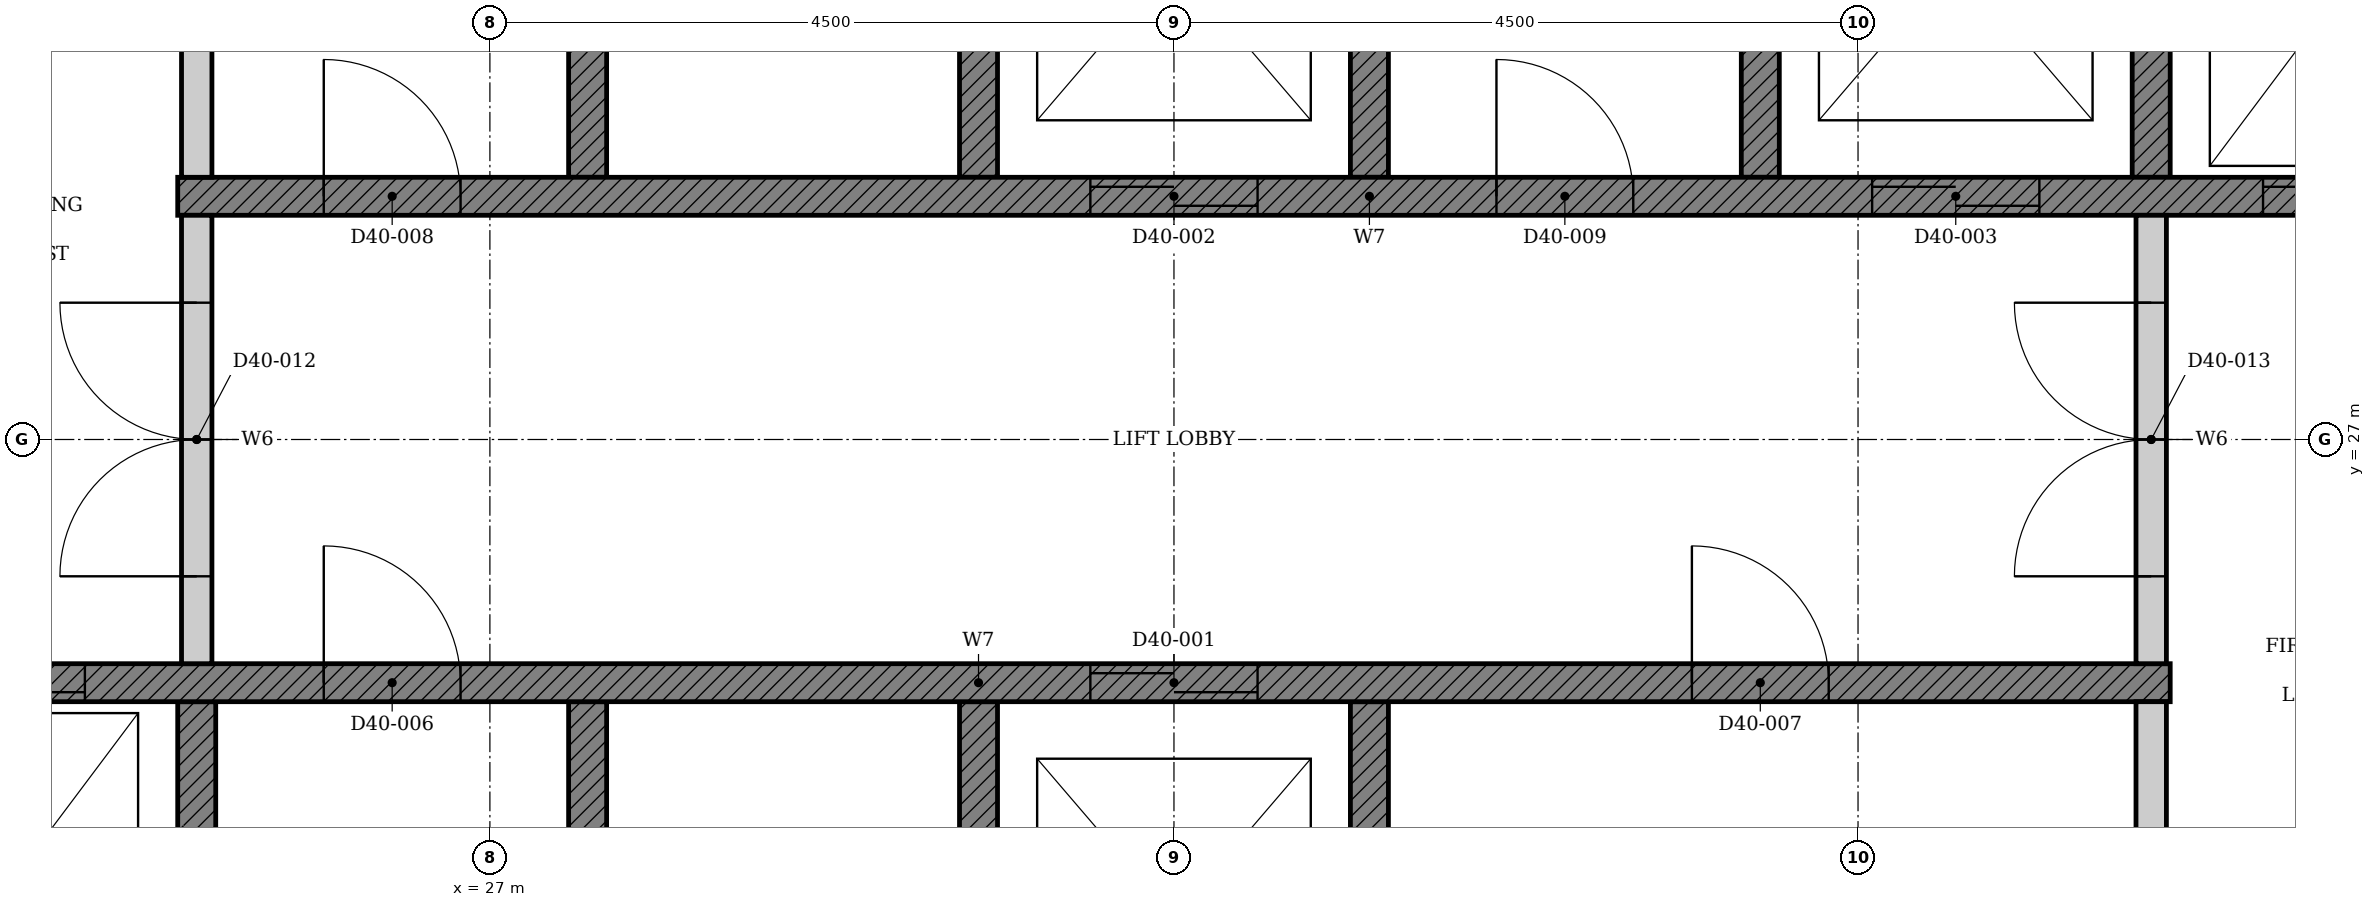
"""IFC4 building model, lengths in metres.
Left out: names, types, materials, properties, quantities, classifications, styles, units other than length and angle.
Written with IfcOpenShell. Run it as: python <this file> out.ifc"""

import sys

from ifc_helpers import new_model, si_unit, direction, frame, frame_2d, origin, place, context, subcontext, project, spatial, polyline, rectangle, outline, extrude, element, fill, save


model = new_model("IFC4")
c1 = context("Model", 3, precision=1e-05, world=origin(), true_north=direction((0.0, 1.0)))
c2 = subcontext(c1, "Body", "Model", "MODEL_VIEW")
j1 = project(units=[si_unit("LENGTHUNIT", "METRE"), si_unit("PLANEANGLEUNIT", "RADIAN")], contexts=[c1])
p1 = place(None, origin())
s1 = spatial("IfcSite", under=j1, at=p1, CompositionType="ELEMENT")
p2 = place(p1, origin())
s2 = spatial("IfcBuilding", under=s1, at=p2, CompositionType="ELEMENT")
p3 = place(p2, frame((0.0, 0.0, 161.7)))
s3 = spatial("IfcBuildingStorey", under=s2, at=p3, CompositionType="ELEMENT", Elevation=161.7)
p4 = place(p3, origin())
e1 = element("IfcWall", 1, at=p4, inside=s3, PredefinedType="SHEAR", context=c2, shape_type="SweptSolid", body=[
    extrude(outline(polyline([(22.375, 22.35), (25.197, 22.35), (25.197, 25.275), (24.947, 25.275), (24.947, 22.65), (22.625, 22.65), (22.625, 25.275), (22.375, 25.275), (22.375, 22.35)])), origin(), (0.0, 0.0, 1.0), 3.4),
])
p5 = place(p3, origin())
e2 = element("IfcWall", 2, at=p5, inside=s3, PredefinedType="SHEAR", context=c2, shape_type="SweptSolid", body=[
    extrude(outline(polyline([(27.518, 22.35), (32.911, 22.35), (32.911, 25.275), (32.661, 25.275), (32.661, 22.65), (30.339, 22.65), (30.339, 25.275), (30.089, 25.275), (30.089, 22.65), (27.768, 22.65), (27.768, 25.275), (27.518, 25.275), (27.518, 22.35)])), origin(), (0.0, 0.0, 1.0), 3.4),
])
p6 = place(p3, origin())
e3 = element("IfcWall", 3, at=p6, inside=s3, PredefinedType="SHEAR", context=c2, shape_type="SweptSolid", body=[
    extrude(outline(polyline([(27.518, 28.725), (27.768, 28.725), (27.768, 31.35), (30.089, 31.35), (30.089, 28.725), (30.339, 28.725), (30.339, 31.35), (32.661, 31.35), (32.661, 28.725), (32.911, 28.725), (32.911, 31.65), (27.518, 31.65), (27.518, 28.725)])), origin(), (0.0, 0.0, 1.0), 3.4),
])
p7 = place(p3, origin())
e4 = element("IfcWall", 4, at=p7, inside=s3, PredefinedType="SHEAR", context=c2, shape_type="SweptSolid", body=[
    extrude(outline(polyline([(35.232, 28.725), (35.482, 28.725), (35.482, 31.35), (37.803, 31.35), (37.803, 28.725), (38.053, 28.725), (38.053, 31.35), (40.375, 31.35), (40.375, 28.725), (40.625, 28.725), (40.625, 31.65), (35.232, 31.65), (35.232, 28.725)])), origin(), (0.0, 0.0, 1.0), 3.4),
])
p8 = place(p3, frame((22.375, 25.4, 0.0), z_axis=(0.0, 0.0, 1.0), x_axis=(1.0, 0.0, 0.0)))
e5 = element("IfcWall", 5, at=p8, inside=s3, PredefinedType="SHEAR", context=c2, shape_type="SweptSolid", body=[
    extrude(rectangle(XDim=15.678, YDim=0.25, at=frame_2d((7.839, 0.0))), origin(), (0.0, 0.0, 1.0), 3.4),
])
p9 = place(p8, frame((8.575, 0.0, 0.0)))
e6 = element("IfcOpeningElement", 6, at=p9, cuts=e5, PredefinedType="OPENING", context=c2, shape_type="SweptSolid", body=[
    extrude(rectangle(XDim=1.1, YDim=2.1, at=frame_2d((0.55, 1.05))), frame((0.0, 0.135, 0.0), z_axis=(0.0, -1.0, 0.0), x_axis=(1.0, 0.0, 0.0)), (0.0, 0.0, 1.0), 0.27),
])
p10 = place(p8, frame((0.861, 0.0, 0.0)))
e7 = element("IfcOpeningElement", 7, at=p10, cuts=e5, PredefinedType="OPENING", context=c2, shape_type="SweptSolid", body=[
    extrude(rectangle(XDim=1.1, YDim=2.1, at=frame_2d((0.55, 1.05))), frame((0.0, 0.135, 0.0), z_axis=(0.0, -1.0, 0.0), x_axis=(1.0, 0.0, 0.0)), (0.0, 0.0, 1.0), 0.27),
])
p11 = place(p8, frame((3.532, 0.0, 0.0)))
e8 = element("IfcOpeningElement", 8, at=p11, cuts=e5, PredefinedType="OPENING", context=c2, shape_type="SweptSolid", body=[
    extrude(rectangle(XDim=0.9, YDim=2.1, at=frame_2d((0.45, 1.05))), frame((0.0, 0.135, 0.0), z_axis=(0.0, -1.0, 0.0), x_axis=(1.0, 0.0, 0.0)), (0.0, 0.0, 1.0), 0.27),
])
p12 = place(p8, frame((12.532, 0.0, 0.0)))
e9 = element("IfcOpeningElement", 9, at=p12, cuts=e5, PredefinedType="OPENING", context=c2, shape_type="SweptSolid", body=[
    extrude(rectangle(XDim=0.9, YDim=2.1, at=frame_2d((0.45, 1.05))), frame((0.0, 0.135, 0.0), z_axis=(0.0, -1.0, 0.0), x_axis=(1.0, 0.0, 0.0)), (0.0, 0.0, 1.0), 0.27),
])
p13 = place(p3, frame((24.947, 28.6, 0.0), z_axis=(0.0, 0.0, 1.0), x_axis=(1.0, 0.0, 0.0)))
e10 = element("IfcWall", 10, at=p13, inside=s3, PredefinedType="SHEAR", context=c2, shape_type="SweptSolid", body=[
    extrude(rectangle(XDim=15.678, YDim=0.25, at=frame_2d((7.839, 0.0))), origin(), (0.0, 0.0, 1.0), 3.4),
])
p14 = place(p13, frame((6.004, 0.0, 0.0)))
e11 = element("IfcOpeningElement", 11, at=p14, cuts=e10, PredefinedType="OPENING", context=c2, shape_type="SweptSolid", body=[
    extrude(rectangle(XDim=1.1, YDim=2.1, at=frame_2d((0.55, 1.05))), frame((0.0, 0.135, 0.0), z_axis=(0.0, -1.0, 0.0), x_axis=(1.0, 0.0, 0.0)), (0.0, 0.0, 1.0), 0.27),
])
p15 = place(p13, frame((11.146, 0.0, 0.0)))
e12 = element("IfcOpeningElement", 12, at=p15, cuts=e10, PredefinedType="OPENING", context=c2, shape_type="SweptSolid", body=[
    extrude(rectangle(XDim=1.1, YDim=2.1, at=frame_2d((0.55, 1.05))), frame((0.0, 0.135, 0.0), z_axis=(0.0, -1.0, 0.0), x_axis=(1.0, 0.0, 0.0)), (0.0, 0.0, 1.0), 0.27),
])
p16 = place(p13, frame((13.718, 0.0, 0.0)))
e13 = element("IfcOpeningElement", 13, at=p16, cuts=e10, PredefinedType="OPENING", context=c2, shape_type="SweptSolid", body=[
    extrude(rectangle(XDim=1.1, YDim=2.1, at=frame_2d((0.55, 1.05))), frame((0.0, 0.135, 0.0), z_axis=(0.0, -1.0, 0.0), x_axis=(1.0, 0.0, 0.0)), (0.0, 0.0, 1.0), 0.27),
])
p17 = place(p13, frame((0.961, 0.0, 0.0)))
e14 = element("IfcOpeningElement", 14, at=p17, cuts=e10, PredefinedType="OPENING", context=c2, shape_type="SweptSolid", body=[
    extrude(rectangle(XDim=0.9, YDim=2.1, at=frame_2d((0.45, 1.05))), frame((0.0, 0.135, 0.0), z_axis=(0.0, -1.0, 0.0), x_axis=(1.0, 0.0, 0.0)), (0.0, 0.0, 1.0), 0.27),
])
p18 = place(p13, frame((8.675, 0.0, 0.0)))
e15 = element("IfcOpeningElement", 15, at=p18, cuts=e10, PredefinedType="OPENING", context=c2, shape_type="SweptSolid", body=[
    extrude(rectangle(XDim=0.9, YDim=2.1, at=frame_2d((0.45, 1.05))), frame((0.0, 0.135, 0.0), z_axis=(0.0, -1.0, 0.0), x_axis=(1.0, 0.0, 0.0)), (0.0, 0.0, 1.0), 0.27),
])
for number, where, z_axis, x_axis in (
    (16, (37.928, 22.65, 0.0), (0.0, 0.0, 1.0), (0.0, 1.0, 0.0)),
    (17, (25.072, 28.725, 0.0), (0.0, 0.0, 1.0), (0.0, 1.0, 0.0)),
):
    element("IfcWall", number, at=place(p3, frame(where, z_axis=z_axis, x_axis=x_axis)), inside=s3, PredefinedType="PARTITIONING", context=c2, shape_type="SweptSolid", body=[
        extrude(rectangle(XDim=2.625, YDim=0.2, at=frame_2d((1.312, 0.0))), origin(), (0.0, 0.0, 1.0), 3.4),
    ])
p19 = place(p3, frame((25.072, 25.525, 0.0), z_axis=(0.0, 0.0, 1.0), x_axis=(0.0, 1.0, 0.0)))
e18 = element("IfcWall", 18, at=p19, inside=s3, PredefinedType="PARTITIONING", context=c2, shape_type="SweptSolid", body=[
    extrude(rectangle(XDim=2.95, YDim=0.2, at=frame_2d((1.475, 0.0))), origin(), (0.0, 0.0, 1.0), 3.4),
])
p20 = place(p19, frame((0.575, 0.0, 0.0)))
e19 = element("IfcOpeningElement", 19, at=p20, cuts=e18, PredefinedType="OPENING", context=c2, shape_type="SweptSolid", body=[
    extrude(rectangle(XDim=1.8, YDim=2.1, at=frame_2d((0.9, 1.05))), frame((0.0, 0.11, 0.0), z_axis=(0.0, -1.0, 0.0), x_axis=(1.0, 0.0, 0.0)), (0.0, 0.0, 1.0), 0.22),
])
p21 = place(p3, frame((37.928, 25.525, 0.0), z_axis=(0.0, 0.0, 1.0), x_axis=(0.0, 1.0, 0.0)))
e20 = element("IfcWall", 20, at=p21, inside=s3, PredefinedType="PARTITIONING", context=c2, shape_type="SweptSolid", body=[
    extrude(rectangle(XDim=2.95, YDim=0.2, at=frame_2d((1.475, 0.0))), origin(), (0.0, 0.0, 1.0), 3.4),
])
p22 = place(p21, frame((0.575, 0.0, 0.0)))
e21 = element("IfcOpeningElement", 21, at=p22, cuts=e20, PredefinedType="OPENING", context=c2, shape_type="SweptSolid", body=[
    extrude(rectangle(XDim=1.8, YDim=2.1, at=frame_2d((0.9, 1.05))), frame((0.0, 0.11, 0.0), z_axis=(0.0, -1.0, 0.0), x_axis=(1.0, 0.0, 0.0)), (0.0, 0.0, 1.0), 0.22),
])
p23 = place(p9, origin())
e22 = element("IfcDoor", 22, at=p23, inside=s3, OperationType="DOUBLE_DOOR_SLIDING", PredefinedType="DOOR", context=c2, shape_type="SweptSolid", body=[
    extrude(rectangle(XDim=1.1, YDim=2.1, at=frame_2d((0.55, 1.05))), frame((0.0, 0.025, 0.0), z_axis=(0.0, -1.0, 0.0), x_axis=(1.0, 0.0, 0.0)), (0.0, 0.0, 1.0), 0.05),
])
fill(e6, e22)
p24 = place(p14, origin())
e23 = element("IfcDoor", 23, at=p24, inside=s3, OperationType="DOUBLE_DOOR_SLIDING", PredefinedType="DOOR", context=c2, shape_type="SweptSolid", body=[
    extrude(rectangle(XDim=1.1, YDim=2.1, at=frame_2d((0.55, 1.05))), frame((0.0, 0.025, 0.0), z_axis=(0.0, -1.0, 0.0), x_axis=(1.0, 0.0, 0.0)), (0.0, 0.0, 1.0), 0.05),
])
fill(e11, e23)
p25 = place(p15, origin())
e24 = element("IfcDoor", 24, at=p25, inside=s3, OperationType="DOUBLE_DOOR_SLIDING", PredefinedType="DOOR", context=c2, shape_type="SweptSolid", body=[
    extrude(rectangle(XDim=1.1, YDim=2.1, at=frame_2d((0.55, 1.05))), frame((0.0, 0.025, 0.0), z_axis=(0.0, -1.0, 0.0), x_axis=(1.0, 0.0, 0.0)), (0.0, 0.0, 1.0), 0.05),
])
fill(e12, e24)
p26 = place(p10, origin())
e25 = element("IfcDoor", 25, at=p26, inside=s3, OperationType="DOUBLE_DOOR_SLIDING", PredefinedType="DOOR", context=c2, shape_type="SweptSolid", body=[
    extrude(rectangle(XDim=1.1, YDim=2.1, at=frame_2d((0.55, 1.05))), frame((0.0, 0.025, 0.0), z_axis=(0.0, -1.0, 0.0), x_axis=(1.0, 0.0, 0.0)), (0.0, 0.0, 1.0), 0.05),
])
fill(e7, e25)
p27 = place(p16, origin())
e26 = element("IfcDoor", 26, at=p27, inside=s3, OperationType="DOUBLE_DOOR_SLIDING", PredefinedType="DOOR", context=c2, shape_type="SweptSolid", body=[
    extrude(rectangle(XDim=1.1, YDim=2.1, at=frame_2d((0.55, 1.05))), frame((0.0, 0.025, 0.0), z_axis=(0.0, -1.0, 0.0), x_axis=(1.0, 0.0, 0.0)), (0.0, 0.0, 1.0), 0.05),
])
fill(e13, e26)
p28 = place(p11, origin())
e27 = element("IfcDoor", 27, at=p28, inside=s3, OperationType="SINGLE_SWING_LEFT", PredefinedType="DOOR", context=c2, shape_type="SweptSolid", body=[
    extrude(rectangle(XDim=0.9, YDim=2.1, at=frame_2d((0.45, 1.05))), frame((0.0, 0.025, 0.0), z_axis=(0.0, -1.0, 0.0), x_axis=(1.0, 0.0, 0.0)), (0.0, 0.0, 1.0), 0.05),
])
fill(e8, e27)
p29 = place(p12, origin())
e28 = element("IfcDoor", 28, at=p29, inside=s3, OperationType="SINGLE_SWING_LEFT", PredefinedType="DOOR", context=c2, shape_type="SweptSolid", body=[
    extrude(rectangle(XDim=0.9, YDim=2.1, at=frame_2d((0.45, 1.05))), frame((0.0, 0.025, 0.0), z_axis=(0.0, -1.0, 0.0), x_axis=(1.0, 0.0, 0.0)), (0.0, 0.0, 1.0), 0.05),
])
fill(e9, e28)
p30 = place(p17, origin())
e29 = element("IfcDoor", 29, at=p30, inside=s3, OperationType="SINGLE_SWING_LEFT", PredefinedType="DOOR", context=c2, shape_type="SweptSolid", body=[
    extrude(rectangle(XDim=0.9, YDim=2.1, at=frame_2d((0.45, 1.05))), frame((0.0, 0.025, 0.0), z_axis=(0.0, -1.0, 0.0), x_axis=(1.0, 0.0, 0.0)), (0.0, 0.0, 1.0), 0.05),
])
fill(e14, e29)
p31 = place(p18, origin())
e30 = element("IfcDoor", 30, at=p31, inside=s3, OperationType="SINGLE_SWING_LEFT", PredefinedType="DOOR", context=c2, shape_type="SweptSolid", body=[
    extrude(rectangle(XDim=0.9, YDim=2.1, at=frame_2d((0.45, 1.05))), frame((0.0, 0.025, 0.0), z_axis=(0.0, -1.0, 0.0), x_axis=(1.0, 0.0, 0.0)), (0.0, 0.0, 1.0), 0.05),
])
fill(e15, e30)
p32 = place(p20, origin())
e31 = element("IfcDoor", 31, at=p32, inside=s3, OperationType="DOUBLE_DOOR_SINGLE_SWING", PredefinedType="DOOR", context=c2, shape_type="SweptSolid", body=[
    extrude(rectangle(XDim=1.8, YDim=2.1, at=frame_2d((0.9, 1.05))), frame((0.0, 0.025, 0.0), z_axis=(0.0, -1.0, 0.0), x_axis=(1.0, 0.0, 0.0)), (0.0, 0.0, 1.0), 0.05),
])
fill(e19, e31)
p33 = place(p22, origin())
e32 = element("IfcDoor", 32, at=p33, inside=s3, OperationType="DOUBLE_DOOR_SINGLE_SWING", PredefinedType="DOOR", context=c2, shape_type="SweptSolid", body=[
    extrude(rectangle(XDim=1.8, YDim=2.1, at=frame_2d((0.9, 1.05))), frame((0.0, 0.025, 0.0), z_axis=(0.0, -1.0, 0.0), x_axis=(1.0, 0.0, 0.0)), (0.0, 0.0, 1.0), 0.05),
])
fill(e21, e32)
save(model, sys.argv[1])
